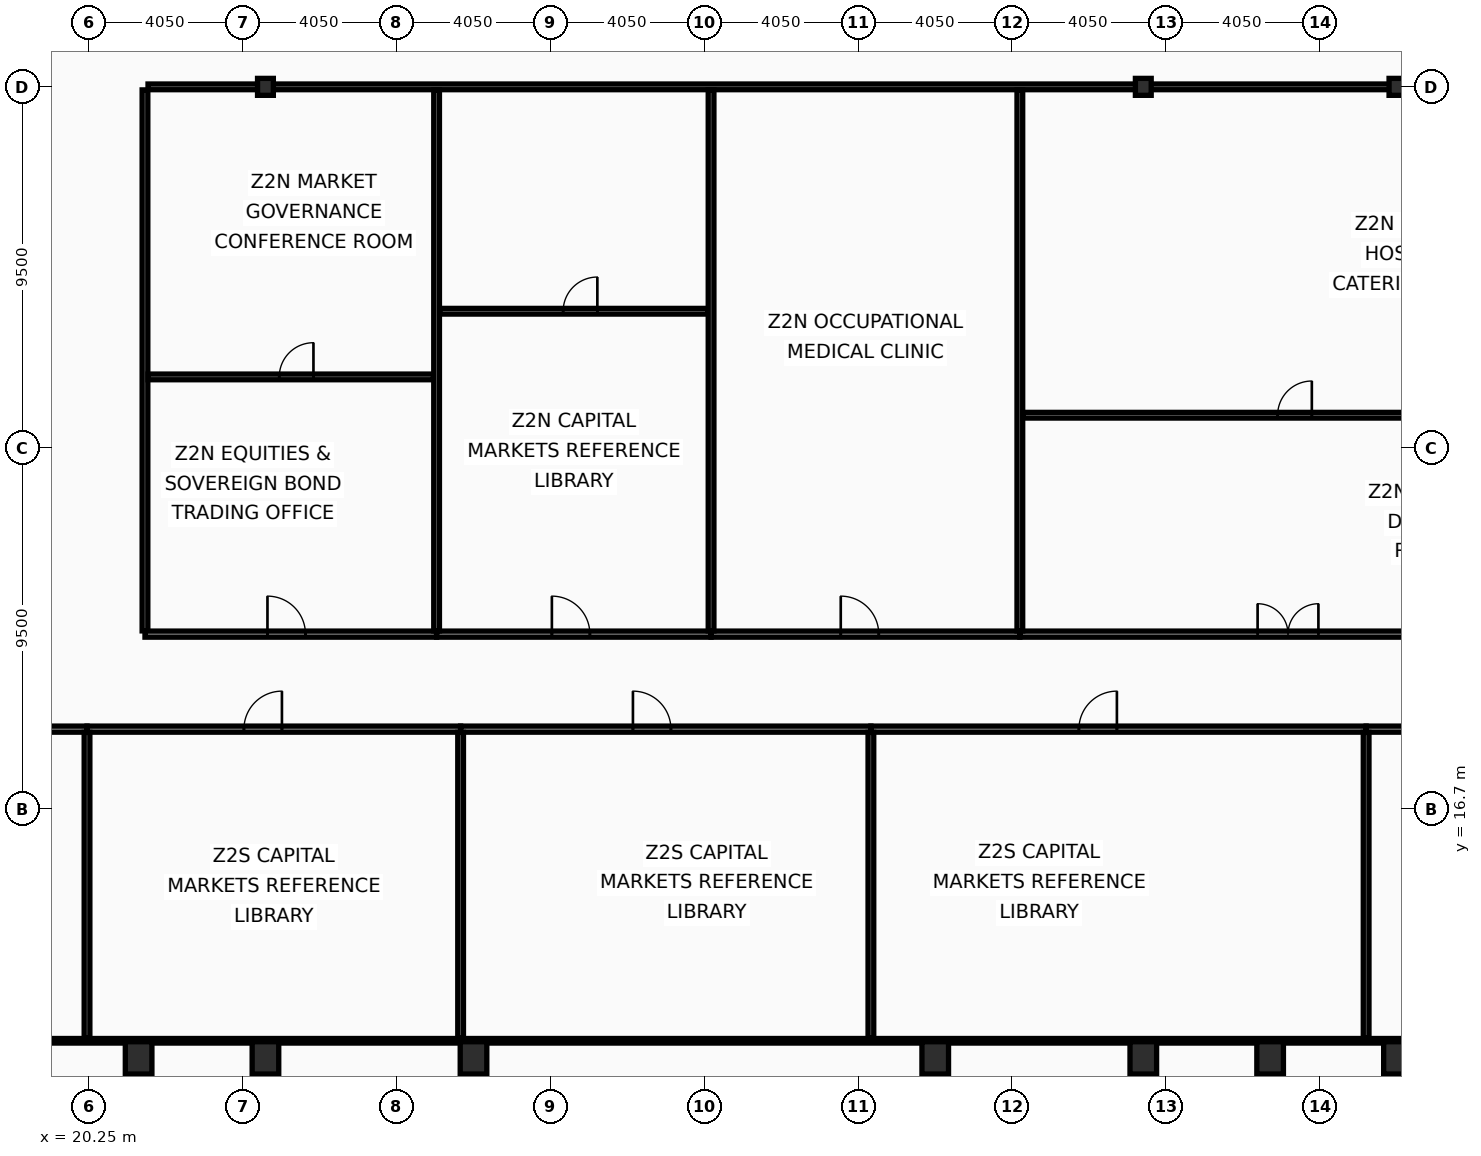
"""IFC4 building model, lengths in metres.
Left out: names, types, materials, properties, quantities, classifications, styles, units other than length and angle.
Written with IfcOpenShell. Run it as: python <this file> out.ifc"""

import sys

from ifc_helpers import new_model, si_unit, direction, frame, frame_2d, origin, origin_2d, place, context, subcontext, project, spatial, rectangle, hollow_rectangle, i_section, extrude, element, fill, save


model = new_model("IFC4")
c1 = context("Model", 3, precision=1e-05, world=origin(), true_north=direction((0.0, 1.0)))
c2 = subcontext(c1, "Body", "Model", "MODEL_VIEW")
j1 = project(units=[si_unit("LENGTHUNIT", "METRE"), si_unit("PLANEANGLEUNIT", "RADIAN")], contexts=[c1])
p1 = place(None, origin())
s1 = spatial("IfcSite", under=j1, at=p1, CompositionType="ELEMENT")
p2 = place(p1, origin())
s2 = spatial("IfcBuilding", under=s1, at=p2, CompositionType="ELEMENT")
p3 = place(p2, frame((0.0, 0.0, 150.6)))
s3 = spatial("IfcBuildingStorey", under=s2, at=p3, CompositionType="ELEMENT", Elevation=150.6)
for number, where, z_axis, x_axis in (
    (1, (21.562, 10.15, 0.0), (0.0, 0.0, 1.0), (1.0, 0.0, 0.0)),
    (2, (24.9, 10.15, 0.0), (0.0, 0.0, 1.0), (1.0, 0.0, 0.0)),
    (3, (30.375, 10.15, 0.0), (0.0, 0.0, 1.0), (1.0, 0.0, 0.0)),
    (4, (42.525, 10.15, 0.0), (0.0, 0.0, 1.0), (1.0, 0.0, 0.0)),
    (5, (48.0, 10.15, 0.0), (0.0, 0.0, 1.0), (1.0, 0.0, 0.0)),
    (6, (51.337, 10.15, 0.0), (0.0, 0.0, 1.0), (1.0, 0.0, 0.0)),
    (7, (54.675, 10.15, 0.0), (0.0, 0.0, 1.0), (1.0, 0.0, 0.0)),
):
    element("IfcColumn", number, at=place(p3, frame(where, z_axis=z_axis, x_axis=x_axis)), inside=s3, PredefinedType="COLUMN", context=c2, shape_type="SweptSolid", body=[
        extrude(hollow_rectangle(XDim=0.7, YDim=0.85, WallThickness=0.05, at=origin_2d()), origin(), (0.0, 0.0, 1.0), 3.6),
    ])
for number, where, z_axis, x_axis in (
    (8, (24.9, 35.7, 0.0), (0.0, 0.0, 1.0), (1.0, 0.0, 0.0)),
    (9, (48.0, 35.7, 0.0), (0.0, 0.0, 1.0), (1.0, 0.0, 0.0)),
    (10, (54.675, 35.7, 0.0), (0.0, 0.0, 1.0), (1.0, 0.0, 0.0)),
):
    element("IfcColumn", number, at=place(p3, frame(where, z_axis=z_axis, x_axis=x_axis)), inside=s3, PredefinedType="COLUMN", context=c2, shape_type="SweptSolid", body=[
        extrude(i_section(OverallWidth=0.416, OverallDepth=0.446, WebThickness=0.039, FlangeThickness=0.063, at=origin_2d()), origin(), (0.0, 0.0, 1.0), 3.6),
    ])
p4 = place(p3, frame((6.03, 18.8, 0.0), z_axis=(0.0, 0.0, 1.0), x_axis=(1.0, 0.0, 0.0)))
e11 = element("IfcWall", 11, at=p4, inside=s3, PredefinedType="PARTITIONING", context=c2, shape_type="SweptSolid", body=[
    extrude(rectangle(XDim=14.175, YDim=0.16, at=frame_2d((7.087, 0.0))), origin(), (0.0, 0.0, 1.0), 2.73),
])
p5 = place(p4, frame((5.953, 0.0, 0.0)))
e12 = element("IfcOpeningElement", 12, at=p5, cuts=e11, PredefinedType="OPENING", context=c2, shape_type="SweptSolid", body=[
    extrude(rectangle(XDim=1.6, YDim=2.15, at=frame_2d((0.8, 1.075))), frame((0.0, 0.09, 0.0), z_axis=(0.0, -1.0, 0.0), x_axis=(1.0, 0.0, 0.0)), (0.0, 0.0, 1.0), 0.18),
])
p6 = place(p3, frame((20.205, 18.8, 0.0), z_axis=(0.0, 0.0, 1.0), x_axis=(1.0, 0.0, 0.0)))
e13 = element("IfcWall", 13, at=p6, inside=s3, PredefinedType="PARTITIONING", context=c2, shape_type="SweptSolid", body=[
    extrude(rectangle(XDim=9.831, YDim=0.16, at=frame_2d((4.916, 0.0))), origin(), (0.0, 0.0, 1.0), 2.73),
])
p7 = place(p6, frame((4.129, 0.0, 0.0)))
e14 = element("IfcOpeningElement", 14, at=p7, cuts=e13, PredefinedType="OPENING", context=c2, shape_type="SweptSolid", body=[
    extrude(rectangle(XDim=1.0, YDim=2.05, at=frame_2d((0.5, 1.025))), frame((0.0, 0.09, 0.0), z_axis=(0.0, -1.0, 0.0), x_axis=(1.0, 0.0, 0.0)), (0.0, 0.0, 1.0), 0.18),
])
p8 = place(p3, frame((20.205, 10.665, 0.0), z_axis=(0.0, 0.0, 1.0), x_axis=(0.0, 1.0, 0.0)))
e15 = element("IfcWall", 15, at=p8, inside=s3, PredefinedType="PARTITIONING", context=c2, shape_type="SweptSolid", body=[
    extrude(rectangle(XDim=8.05, YDim=0.15, at=frame_2d((4.025, 0.0))), origin(), (0.0, 0.0, 1.0), 2.93),
])
p9 = place(p3, frame((30.036, 18.8, 0.0), z_axis=(0.0, 0.0, 1.0), x_axis=(1.0, 0.0, 0.0)))
e16 = element("IfcWall", 16, at=p9, inside=s3, PredefinedType="PARTITIONING", context=c2, shape_type="SweptSolid", body=[
    extrude(rectangle(XDim=10.796, YDim=0.16, at=frame_2d((5.398, 0.0))), origin(), (0.0, 0.0, 1.0), 2.73),
])
p10 = place(p9, frame((4.534, 0.0, 0.0)))
e17 = element("IfcOpeningElement", 17, at=p10, cuts=e16, PredefinedType="OPENING", context=c2, shape_type="SweptSolid", body=[
    extrude(rectangle(XDim=1.0, YDim=2.05, at=frame_2d((0.5, 1.025))), frame((0.0, 0.09, 0.0), z_axis=(0.0, -1.0, 0.0), x_axis=(1.0, 0.0, 0.0)), (0.0, 0.0, 1.0), 0.18),
])
p11 = place(p3, frame((30.036, 10.665, 0.0), z_axis=(0.0, 0.0, 1.0), x_axis=(0.0, 1.0, 0.0)))
e18 = element("IfcWall", 18, at=p11, inside=s3, PredefinedType="PARTITIONING", context=c2, shape_type="SweptSolid", body=[
    extrude(rectangle(XDim=8.05, YDim=0.15, at=frame_2d((4.025, 0.0))), origin(), (0.0, 0.0, 1.0), 2.73),
])
p12 = place(p3, frame((40.832, 18.8, 0.0), z_axis=(0.0, 0.0, 1.0), x_axis=(1.0, 0.0, 0.0)))
e19 = element("IfcWall", 19, at=p12, inside=s3, PredefinedType="PARTITIONING", context=c2, shape_type="SweptSolid", body=[
    extrude(rectangle(XDim=13.032, YDim=0.16, at=frame_2d((6.516, 0.0))), origin(), (0.0, 0.0, 1.0), 2.73),
])
p13 = place(p12, frame((5.473, 0.0, 0.0)))
e20 = element("IfcOpeningElement", 20, at=p13, cuts=e19, PredefinedType="OPENING", context=c2, shape_type="SweptSolid", body=[
    extrude(rectangle(XDim=1.0, YDim=2.05, at=frame_2d((0.5, 1.025))), frame((0.0, 0.09, 0.0), z_axis=(0.0, -1.0, 0.0), x_axis=(1.0, 0.0, 0.0)), (0.0, 0.0, 1.0), 0.18),
])
p14 = place(p3, frame((40.832, 10.665, 0.0), z_axis=(0.0, 0.0, 1.0), x_axis=(0.0, 1.0, 0.0)))
e21 = element("IfcWall", 21, at=p14, inside=s3, PredefinedType="PARTITIONING", context=c2, shape_type="SweptSolid", body=[
    extrude(rectangle(XDim=8.05, YDim=0.15, at=frame_2d((4.025, 0.0))), origin(), (0.0, 0.0, 1.0), 2.93),
])
p15 = place(p3, frame((53.864, 18.8, 0.0), z_axis=(0.0, 0.0, 1.0), x_axis=(1.0, 0.0, 0.0)))
e22 = element("IfcWall", 22, at=p15, inside=s3, PredefinedType="PARTITIONING", context=c2, shape_type="SweptSolid", body=[
    extrude(rectangle(XDim=13.006, YDim=0.16, at=frame_2d((6.503, 0.0))), origin(), (0.0, 0.0, 1.0), 2.73),
])
p16 = place(p15, frame((5.463, 0.0, 0.0)))
e23 = element("IfcOpeningElement", 23, at=p16, cuts=e22, PredefinedType="OPENING", context=c2, shape_type="SweptSolid", body=[
    extrude(rectangle(XDim=1.0, YDim=2.05, at=frame_2d((0.5, 1.025))), frame((0.0, 0.09, 0.0), z_axis=(0.0, -1.0, 0.0), x_axis=(1.0, 0.0, 0.0)), (0.0, 0.0, 1.0), 0.18),
])
p17 = place(p3, frame((53.864, 10.665, 0.0), z_axis=(0.0, 0.0, 1.0), x_axis=(0.0, 1.0, 0.0)))
e24 = element("IfcWall", 24, at=p17, inside=s3, PredefinedType="PARTITIONING", context=c2, shape_type="SweptSolid", body=[
    extrude(rectangle(XDim=8.05, YDim=0.15, at=frame_2d((4.025, 0.0))), origin(), (0.0, 0.0, 1.0), 2.93),
])
p18 = place(p3, frame((21.73, 21.385, 0.0), z_axis=(0.0, 0.0, 1.0), x_axis=(0.0, 1.0, 0.0)))
e25 = element("IfcWall", 25, at=p18, inside=s3, PredefinedType="PARTITIONING", context=c2, shape_type="SweptSolid", body=[
    extrude(rectangle(XDim=14.235, YDim=0.15, at=frame_2d((7.118, 0.0))), origin(), (0.0, 0.0, 1.0), 2.93),
])
p19 = place(p3, frame((21.81, 35.7, 0.0), z_axis=(0.0, 0.0, 1.0), x_axis=(1.0, 0.0, 0.0)))
e26 = element("IfcWall", 26, at=p19, inside=s3, PredefinedType="PARTITIONING", context=c2, shape_type="SweptSolid", body=[
    extrude(rectangle(XDim=44.995, YDim=0.15, at=frame_2d((22.498, 0.0))), origin(), (0.0, 0.0, 1.0), 2.73),
])
p20 = place(p3, frame((21.73, 21.3, 0.0), z_axis=(0.0, 0.0, 1.0), x_axis=(1.0, 0.0, 0.0)))
e27 = element("IfcWall", 27, at=p20, inside=s3, PredefinedType="PARTITIONING", context=c2, shape_type="SweptSolid", body=[
    extrude(rectangle(XDim=7.674, YDim=0.16, at=frame_2d((3.837, 0.0))), origin(), (0.0, 0.0, 1.0), 2.73),
])
p21 = place(p20, frame((3.223, 0.0, 0.0)))
e28 = element("IfcOpeningElement", 28, at=p21, cuts=e27, PredefinedType="OPENING", context=c2, shape_type="SweptSolid", body=[
    extrude(rectangle(XDim=1.0, YDim=2.05, at=frame_2d((0.5, 1.025))), frame((0.0, 0.09, 0.0), z_axis=(0.0, -1.0, 0.0), x_axis=(1.0, 0.0, 0.0)), (0.0, 0.0, 1.0), 0.18),
])
p22 = place(p3, frame((21.81, 28.068, 0.0), z_axis=(0.0, 0.0, 1.0), x_axis=(1.0, 0.0, 0.0)))
e29 = element("IfcWall", 29, at=p22, inside=s3, PredefinedType="PARTITIONING", context=c2, shape_type="SweptSolid", body=[
    extrude(rectangle(XDim=7.514, YDim=0.15, at=frame_2d((3.757, 0.0))), origin(), (0.0, 0.0, 1.0), 2.73),
])
p23 = place(p22, frame((3.453, 0.0, 0.0)))
e30 = element("IfcOpeningElement", 30, at=p23, cuts=e29, PredefinedType="OPENING", context=c2, shape_type="SweptSolid", body=[
    extrude(rectangle(XDim=0.9, YDim=2.05, at=frame_2d((0.45, 1.025))), frame((0.0, 0.085, 0.0), z_axis=(0.0, -1.0, 0.0), x_axis=(1.0, 0.0, 0.0)), (0.0, 0.0, 1.0), 0.17),
])
p24 = place(p3, frame((29.404, 21.3, 0.0), z_axis=(0.0, 0.0, 1.0), x_axis=(1.0, 0.0, 0.0)))
e31 = element("IfcWall", 31, at=p24, inside=s3, PredefinedType="PARTITIONING", context=c2, shape_type="SweptSolid", body=[
    extrude(rectangle(XDim=7.222, YDim=0.16, at=frame_2d((3.611, 0.0))), origin(), (0.0, 0.0, 1.0), 2.73),
])
p25 = place(p24, frame((3.033, 0.0, 0.0)))
e32 = element("IfcOpeningElement", 32, at=p25, cuts=e31, PredefinedType="OPENING", context=c2, shape_type="SweptSolid", body=[
    extrude(rectangle(XDim=1.0, YDim=2.05, at=frame_2d((0.5, 1.025))), frame((0.0, 0.09, 0.0), z_axis=(0.0, -1.0, 0.0), x_axis=(1.0, 0.0, 0.0)), (0.0, 0.0, 1.0), 0.18),
])
p26 = place(p3, frame((29.404, 21.385, 0.0), z_axis=(0.0, 0.0, 1.0), x_axis=(0.0, 1.0, 0.0)))
e33 = element("IfcWall", 33, at=p26, inside=s3, PredefinedType="PARTITIONING", context=c2, shape_type="SweptSolid", body=[
    extrude(rectangle(XDim=14.235, YDim=0.15, at=frame_2d((7.118, 0.0))), origin(), (0.0, 0.0, 1.0), 2.93),
])
p27 = place(p3, frame((29.484, 29.796, 0.0), z_axis=(0.0, 0.0, 1.0), x_axis=(1.0, 0.0, 0.0)))
e34 = element("IfcWall", 34, at=p27, inside=s3, PredefinedType="PARTITIONING", context=c2, shape_type="SweptSolid", body=[
    extrude(rectangle(XDim=7.062, YDim=0.15, at=frame_2d((3.531, 0.0))), origin(), (0.0, 0.0, 1.0), 2.73),
])
p28 = place(p27, frame((3.25, 0.0, 0.0)))
e35 = element("IfcOpeningElement", 35, at=p28, cuts=e34, PredefinedType="OPENING", context=c2, shape_type="SweptSolid", body=[
    extrude(rectangle(XDim=0.9, YDim=2.05, at=frame_2d((0.45, 1.025))), frame((0.0, 0.085, 0.0), z_axis=(0.0, -1.0, 0.0), x_axis=(1.0, 0.0, 0.0)), (0.0, 0.0, 1.0), 0.17),
])
p29 = place(p3, frame((36.626, 21.3, 0.0), z_axis=(0.0, 0.0, 1.0), x_axis=(1.0, 0.0, 0.0)))
e36 = element("IfcWall", 36, at=p29, inside=s3, PredefinedType="PARTITIONING", context=c2, shape_type="SweptSolid", body=[
    extrude(rectangle(XDim=8.125, YDim=0.16, at=frame_2d((4.062, 0.0))), origin(), (0.0, 0.0, 1.0), 2.73),
])
p30 = place(p29, frame((3.413, 0.0, 0.0)))
e37 = element("IfcOpeningElement", 37, at=p30, cuts=e36, PredefinedType="OPENING", context=c2, shape_type="SweptSolid", body=[
    extrude(rectangle(XDim=1.0, YDim=2.05, at=frame_2d((0.5, 1.025))), frame((0.0, 0.09, 0.0), z_axis=(0.0, -1.0, 0.0), x_axis=(1.0, 0.0, 0.0)), (0.0, 0.0, 1.0), 0.18),
])
p31 = place(p3, frame((36.626, 21.385, 0.0), z_axis=(0.0, 0.0, 1.0), x_axis=(0.0, 1.0, 0.0)))
e38 = element("IfcWall", 38, at=p31, inside=s3, PredefinedType="PARTITIONING", context=c2, shape_type="SweptSolid", body=[
    extrude(rectangle(XDim=14.235, YDim=0.15, at=frame_2d((7.118, 0.0))), origin(), (0.0, 0.0, 1.0), 2.93),
])
p32 = place(p3, frame((44.751, 21.3, 0.0), z_axis=(0.0, 0.0, 1.0), x_axis=(1.0, 0.0, 0.0)))
e39 = element("IfcWall", 39, at=p32, inside=s3, PredefinedType="PARTITIONING", context=c2, shape_type="SweptSolid", body=[
    extrude(rectangle(XDim=14.896, YDim=0.16, at=frame_2d((7.448, 0.0))), origin(), (0.0, 0.0, 1.0), 2.73),
])
p33 = place(p32, frame((6.256, 0.0, 0.0)))
e40 = element("IfcOpeningElement", 40, at=p33, cuts=e39, PredefinedType="OPENING", context=c2, shape_type="SweptSolid", body=[
    extrude(rectangle(XDim=1.6, YDim=2.15, at=frame_2d((0.8, 1.075))), frame((0.0, 0.09, 0.0), z_axis=(0.0, -1.0, 0.0), x_axis=(1.0, 0.0, 0.0)), (0.0, 0.0, 1.0), 0.18),
])
p34 = place(p3, frame((44.751, 21.385, 0.0), z_axis=(0.0, 0.0, 1.0), x_axis=(0.0, 1.0, 0.0)))
e41 = element("IfcWall", 41, at=p34, inside=s3, PredefinedType="PARTITIONING", context=c2, shape_type="SweptSolid", body=[
    extrude(rectangle(XDim=14.235, YDim=0.15, at=frame_2d((7.118, 0.0))), origin(), (0.0, 0.0, 1.0), 2.93),
])
p35 = place(p3, frame((44.831, 27.06, 0.0), z_axis=(0.0, 0.0, 1.0), x_axis=(1.0, 0.0, 0.0)))
e42 = element("IfcWall", 42, at=p35, inside=s3, PredefinedType="PARTITIONING", context=c2, shape_type="SweptSolid", body=[
    extrude(rectangle(XDim=14.736, YDim=0.15, at=frame_2d((7.368, 0.0))), origin(), (0.0, 0.0, 1.0), 2.73),
])
p36 = place(p35, frame((6.703, 0.0, 0.0)))
e43 = element("IfcOpeningElement", 43, at=p36, cuts=e42, PredefinedType="OPENING", context=c2, shape_type="SweptSolid", body=[
    extrude(rectangle(XDim=0.9, YDim=2.05, at=frame_2d((0.45, 1.025))), frame((0.0, 0.085, 0.0), z_axis=(0.0, -1.0, 0.0), x_axis=(1.0, 0.0, 0.0)), (0.0, 0.0, 1.0), 0.17),
])
p37 = place(p3, frame((6.095, 10.6, 0.0), z_axis=(0.0, 0.0, 1.0), x_axis=(1.0, 0.0, 0.0)))
e44 = element("IfcWall", 44, at=p37, inside=s3, PredefinedType="PARTITIONING", context=c2, shape_type="SweptSolid", body=[
    extrude(rectangle(XDim=60.71, YDim=0.12, at=frame_2d((30.355, 0.0))), origin(), (0.0, 0.0, 1.0), 2.73),
])
p38 = place(p7, origin())
e45 = element("IfcDoor", 45, at=p38, inside=s3, OperationType="SINGLE_SWING_RIGHT", PredefinedType="DOOR", context=c2, shape_type="SweptSolid", body=[
    extrude(rectangle(XDim=1.0, YDim=2.05, at=frame_2d((0.5, 1.025))), frame((0.0, 0.025, 0.0), z_axis=(0.0, -1.0, 0.0), x_axis=(1.0, 0.0, 0.0)), (0.0, 0.0, 1.0), 0.05),
])
fill(e14, e45)
p39 = place(p10, origin())
e46 = element("IfcDoor", 46, at=p39, inside=s3, OperationType="SINGLE_SWING_LEFT", PredefinedType="DOOR", context=c2, shape_type="SweptSolid", body=[
    extrude(rectangle(XDim=1.0, YDim=2.05, at=frame_2d((0.5, 1.025))), frame((0.0, 0.025, 0.0), z_axis=(0.0, -1.0, 0.0), x_axis=(1.0, 0.0, 0.0)), (0.0, 0.0, 1.0), 0.05),
])
fill(e17, e46)
p40 = place(p13, origin())
e47 = element("IfcDoor", 47, at=p40, inside=s3, OperationType="SINGLE_SWING_RIGHT", PredefinedType="DOOR", context=c2, shape_type="SweptSolid", body=[
    extrude(rectangle(XDim=1.0, YDim=2.05, at=frame_2d((0.5, 1.025))), frame((0.0, 0.025, 0.0), z_axis=(0.0, -1.0, 0.0), x_axis=(1.0, 0.0, 0.0)), (0.0, 0.0, 1.0), 0.05),
])
fill(e20, e47)
p41 = place(p21, origin())
e48 = element("IfcDoor", 48, at=p41, inside=s3, OperationType="SINGLE_SWING_LEFT", PredefinedType="DOOR", context=c2, shape_type="SweptSolid", body=[
    extrude(rectangle(XDim=1.0, YDim=2.05, at=frame_2d((0.5, 1.025))), frame((0.0, 0.025, 0.0), z_axis=(0.0, -1.0, 0.0), x_axis=(1.0, 0.0, 0.0)), (0.0, 0.0, 1.0), 0.05),
])
fill(e28, e48)
p42 = place(p23, origin())
e49 = element("IfcDoor", 49, at=p42, inside=s3, OperationType="SINGLE_SWING_RIGHT", PredefinedType="DOOR", context=c2, shape_type="SweptSolid", body=[
    extrude(rectangle(XDim=0.9, YDim=2.05, at=frame_2d((0.45, 1.025))), frame((0.0, 0.025, 0.0), z_axis=(0.0, -1.0, 0.0), x_axis=(1.0, 0.0, 0.0)), (0.0, 0.0, 1.0), 0.05),
])
fill(e30, e49)
p43 = place(p25, origin())
e50 = element("IfcDoor", 50, at=p43, inside=s3, OperationType="SINGLE_SWING_LEFT", PredefinedType="DOOR", context=c2, shape_type="SweptSolid", body=[
    extrude(rectangle(XDim=1.0, YDim=2.05, at=frame_2d((0.5, 1.025))), frame((0.0, 0.025, 0.0), z_axis=(0.0, -1.0, 0.0), x_axis=(1.0, 0.0, 0.0)), (0.0, 0.0, 1.0), 0.05),
])
fill(e32, e50)
p44 = place(p28, origin())
e51 = element("IfcDoor", 51, at=p44, inside=s3, OperationType="SINGLE_SWING_RIGHT", PredefinedType="DOOR", context=c2, shape_type="SweptSolid", body=[
    extrude(rectangle(XDim=0.9, YDim=2.05, at=frame_2d((0.45, 1.025))), frame((0.0, 0.025, 0.0), z_axis=(0.0, -1.0, 0.0), x_axis=(1.0, 0.0, 0.0)), (0.0, 0.0, 1.0), 0.05),
])
fill(e35, e51)
p45 = place(p30, origin())
e52 = element("IfcDoor", 52, at=p45, inside=s3, OperationType="SINGLE_SWING_LEFT", PredefinedType="DOOR", context=c2, shape_type="SweptSolid", body=[
    extrude(rectangle(XDim=1.0, YDim=2.05, at=frame_2d((0.5, 1.025))), frame((0.0, 0.025, 0.0), z_axis=(0.0, -1.0, 0.0), x_axis=(1.0, 0.0, 0.0)), (0.0, 0.0, 1.0), 0.05),
])
fill(e37, e52)
p46 = place(p33, origin())
e53 = element("IfcDoor", 53, at=p46, inside=s3, OperationType="DOUBLE_DOOR_SINGLE_SWING", PredefinedType="DOOR", context=c2, shape_type="SweptSolid", body=[
    extrude(rectangle(XDim=1.6, YDim=2.15, at=frame_2d((0.8, 1.075))), frame((0.0, 0.025, 0.0), z_axis=(0.0, -1.0, 0.0), x_axis=(1.0, 0.0, 0.0)), (0.0, 0.0, 1.0), 0.05),
])
fill(e40, e53)
p47 = place(p36, origin())
e54 = element("IfcDoor", 54, at=p47, inside=s3, OperationType="SINGLE_SWING_RIGHT", PredefinedType="DOOR", context=c2, shape_type="SweptSolid", body=[
    extrude(rectangle(XDim=0.9, YDim=2.05, at=frame_2d((0.45, 1.025))), frame((0.0, 0.025, 0.0), z_axis=(0.0, -1.0, 0.0), x_axis=(1.0, 0.0, 0.0)), (0.0, 0.0, 1.0), 0.05),
])
fill(e43, e54)
save(model, sys.argv[1])
